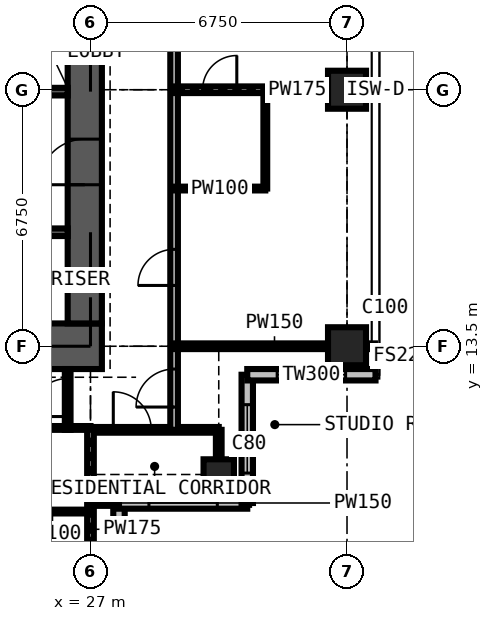
"""IFC4 building model, lengths in metres.
Left out: names, types, materials, properties, quantities, classifications, styles, units other than length and angle.
Written with IfcOpenShell. Run it as: python <this file> out.ifc"""

import sys

from ifc_helpers import new_model, si_unit, direction, frame, frame_2d, origin, origin_2d, place, context, subcontext, project, spatial, rectangle, extrude, element, fill, save


model = new_model("IFC4")
c1 = context("Model", 3, precision=1e-05, world=origin(), true_north=direction((0.0, 1.0)))
c2 = subcontext(c1, "Body", "Model", "MODEL_VIEW")
j1 = project(units=[si_unit("LENGTHUNIT", "METRE"), si_unit("PLANEANGLEUNIT", "RADIAN")], contexts=[c1])
p1 = place(None, origin())
s1 = spatial("IfcSite", under=j1, at=p1, CompositionType="ELEMENT")
p2 = place(p1, origin())
s2 = spatial("IfcBuilding", under=s1, at=p2, CompositionType="ELEMENT")
p3 = place(p2, frame((0.0, 0.0, 236.7)))
s3 = spatial("IfcBuildingStorey", under=s2, at=p3, CompositionType="ELEMENT", Elevation=236.7)
p4 = place(p3, frame((30.375, 10.125, 0.0), z_axis=(0.0, 0.0, 1.0), x_axis=(1.0, 0.0, 0.0)))
e1 = element("IfcColumn", 1, at=p4, inside=s3, PredefinedType="COLUMN", context=c2, shape_type="SweptSolid", body=[
    extrude(rectangle(XDim=0.8, YDim=0.8, at=origin_2d()), origin(), (0.0, 0.0, 1.0), 3.6),
])
for number, where, z_axis, x_axis in (
    (2, (33.75, 13.5, 0.0), (0.0, 0.0, 1.0), (1.0, 0.0, 0.0)),
    (3, (33.75, 20.25, 0.0), (0.0, 0.0, 1.0), (1.0, 0.0, 0.0)),
):
    element("IfcColumn", number, at=place(p3, frame(where, z_axis=z_axis, x_axis=x_axis)), inside=s3, PredefinedType="COLUMN", context=c2, shape_type="SweptSolid", body=[
        extrude(rectangle(XDim=1.0, YDim=1.0, at=origin_2d()), origin(), (0.0, 0.0, 1.0), 3.6),
    ])
p5 = place(p3, frame((13.2, 13.5, 0.0), z_axis=(0.0, 0.0, 1.0), x_axis=(1.0, 0.0, 0.0)))
e4 = element("IfcWall", 4, at=p5, inside=s3, PredefinedType="SHEAR", context=c2, shape_type="SweptSolid", body=[
    extrude(rectangle(XDim=14.1, YDim=1.2, at=frame_2d((7.05, 0.0))), origin(), (0.0, 0.0, 1.0), 3.6),
])
p6 = place(p3, frame((26.85, 14.1, 0.0), z_axis=(0.0, 0.0, 1.0), x_axis=(0.0, 1.0, 0.0)))
e5 = element("IfcWall", 5, at=p6, inside=s3, PredefinedType="SHEAR", context=c2, shape_type="SweptSolid", body=[
    extrude(rectangle(XDim=12.3, YDim=0.9, at=frame_2d((6.15, 0.0))), origin(), (0.0, 0.0, 1.0), 3.6),
])
p7 = place(p6, frame((3.65, 0.0, 0.0)))
e6 = element("IfcOpeningElement", 6, at=p7, cuts=e5, PredefinedType="OPENING", context=c2, shape_type="SweptSolid", body=[
    extrude(rectangle(XDim=1.2, YDim=2.2, at=frame_2d((0.6, 1.1))), frame((0.0, 0.46, 0.0), z_axis=(0.0, -1.0, 0.0), x_axis=(1.0, 0.0, 0.0)), (0.0, 0.0, 1.0), 0.92),
])
p8 = place(p3, frame((27.75, 6.0, 0.0), z_axis=(0.0, 0.0, 1.0), x_axis=(0.0, 1.0, 0.0)))
e7 = element("IfcWall", 7, at=p8, inside=s3, PredefinedType="SOLIDWALL", context=c2, shape_type="SweptSolid", body=[
    extrude(rectangle(XDim=3.375, YDim=0.3, at=frame_2d((1.688, 0.0))), origin(), (0.0, 0.0, 1.0), 3.375),
])
p9 = place(p8, frame((0.788, 0.0, 0.6)))
e8 = element("IfcOpeningElement", 8, at=p9, cuts=e7, PredefinedType="OPENING", context=c2, shape_type="SweptSolid", body=[
    extrude(rectangle(XDim=1.8, YDim=2.1, at=frame_2d((0.9, 1.05))), frame((0.0, 0.16, 0.0), z_axis=(0.0, -1.0, 0.0), x_axis=(1.0, 0.0, 0.0)), (0.0, 0.0, 1.0), 0.32),
])
p10 = place(p3, frame((27.75, 9.375, 0.0), z_axis=(0.0, 0.0, 1.0), x_axis=(1.0, 0.0, 0.0)))
e9 = element("IfcWall", 9, at=p10, inside=s3, PredefinedType="SOLIDWALL", context=c2, shape_type="SweptSolid", body=[
    extrude(rectangle(XDim=3.375, YDim=0.3, at=frame_2d((1.688, 0.0))), origin(), (0.0, 0.0, 1.0), 3.375),
])
p11 = place(p10, frame((0.788, 0.0, 0.6)))
e10 = element("IfcOpeningElement", 10, at=p11, cuts=e9, PredefinedType="OPENING", context=c2, shape_type="SweptSolid", body=[
    extrude(rectangle(XDim=1.8, YDim=2.1, at=frame_2d((0.9, 1.05))), frame((0.0, 0.16, 0.0), z_axis=(0.0, -1.0, 0.0), x_axis=(1.0, 0.0, 0.0)), (0.0, 0.0, 1.0), 0.32),
])
p12 = place(p3, frame((31.125, 9.375, 0.0), z_axis=(0.0, 0.0, 1.0), x_axis=(0.0, 1.0, 0.0)))
e11 = element("IfcWall", 11, at=p12, inside=s3, PredefinedType="SOLIDWALL", context=c2, shape_type="SweptSolid", body=[
    extrude(rectangle(XDim=3.375, YDim=0.3, at=frame_2d((1.688, 0.0))), origin(), (0.0, 0.0, 1.0), 3.375),
])
p13 = place(p12, frame((0.788, 0.0, 0.6)))
e12 = element("IfcOpeningElement", 12, at=p13, cuts=e11, PredefinedType="OPENING", context=c2, shape_type="SweptSolid", body=[
    extrude(rectangle(XDim=1.8, YDim=2.1, at=frame_2d((0.9, 1.05))), frame((0.0, 0.16, 0.0), z_axis=(0.0, -1.0, 0.0), x_axis=(1.0, 0.0, 0.0)), (0.0, 0.0, 1.0), 0.32),
])
p14 = place(p3, frame((31.125, 12.75, 0.0), z_axis=(0.0, 0.0, 1.0), x_axis=(1.0, 0.0, 0.0)))
e13 = element("IfcWall", 13, at=p14, inside=s3, PredefinedType="SOLIDWALL", context=c2, shape_type="SweptSolid", body=[
    extrude(rectangle(XDim=3.375, YDim=0.3, at=frame_2d((1.688, 0.0))), origin(), (0.0, 0.0, 1.0), 3.375),
])
p15 = place(p14, frame((0.788, 0.0, 0.6)))
e14 = element("IfcOpeningElement", 14, at=p15, cuts=e13, PredefinedType="OPENING", context=c2, shape_type="SweptSolid", body=[
    extrude(rectangle(XDim=1.8, YDim=2.1, at=frame_2d((0.9, 1.05))), frame((0.0, 0.16, 0.0), z_axis=(0.0, -1.0, 0.0), x_axis=(1.0, 0.0, 0.0)), (0.0, 0.0, 1.0), 0.32),
])
p16 = place(p3, frame((14.1, 16.5, 0.0), z_axis=(0.0, 0.0, 1.0), x_axis=(1.0, 0.0, 0.0)))
e15 = element("IfcWall", 15, at=p16, inside=s3, PredefinedType="SHEAR", context=c2, shape_type="SweptSolid", body=[
    extrude(rectangle(XDim=12.3, YDim=0.2, at=frame_2d((6.15, 0.0))), origin(), (0.0, 0.0, 1.0), 3.6),
])
p17 = place(p16, frame((0.9, 0.0, 0.0)))
e16 = element("IfcOpeningElement", 16, at=p17, cuts=e15, PredefinedType="OPENING", context=c2, shape_type="SweptSolid", body=[
    extrude(rectangle(XDim=1.1, YDim=2.2, at=frame_2d((0.55, 1.1))), frame((0.0, 0.11, 0.0), z_axis=(0.0, -1.0, 0.0), x_axis=(1.0, 0.0, 0.0)), (0.0, 0.0, 1.0), 0.22),
])
p18 = place(p16, frame((4.31, 0.0, 0.0)))
e17 = element("IfcOpeningElement", 17, at=p18, cuts=e15, PredefinedType="OPENING", context=c2, shape_type="SweptSolid", body=[
    extrude(rectangle(XDim=1.1, YDim=2.2, at=frame_2d((0.55, 1.1))), frame((0.0, 0.11, 0.0), z_axis=(0.0, -1.0, 0.0), x_axis=(1.0, 0.0, 0.0)), (0.0, 0.0, 1.0), 0.22),
])
p19 = place(p16, frame((6.45, 0.0, 0.0)))
e18 = element("IfcOpeningElement", 18, at=p19, cuts=e15, PredefinedType="OPENING", context=c2, shape_type="SweptSolid", body=[
    extrude(rectangle(XDim=1.1, YDim=2.2, at=frame_2d((0.55, 1.1))), frame((0.0, 0.11, 0.0), z_axis=(0.0, -1.0, 0.0), x_axis=(1.0, 0.0, 0.0)), (0.0, 0.0, 1.0), 0.22),
])
p20 = place(p16, frame((9.5, 0.0, 0.0)))
e19 = element("IfcOpeningElement", 19, at=p20, cuts=e15, PredefinedType="OPENING", context=c2, shape_type="SweptSolid", body=[
    extrude(rectangle(XDim=1.1, YDim=2.2, at=frame_2d((0.55, 1.1))), frame((0.0, 0.11, 0.0), z_axis=(0.0, -1.0, 0.0), x_axis=(1.0, 0.0, 0.0)), (0.0, 0.0, 1.0), 0.22),
])
p21 = place(p3, frame((14.1, 20.2, 0.0), z_axis=(0.0, 0.0, 1.0), x_axis=(1.0, 0.0, 0.0)))
e20 = element("IfcWall", 20, at=p21, inside=s3, PredefinedType="SHEAR", context=c2, shape_type="SweptSolid", body=[
    extrude(rectangle(XDim=12.3, YDim=0.2, at=frame_2d((6.15, 0.0))), origin(), (0.0, 0.0, 1.0), 3.6),
])
p22 = place(p21, frame((4.56, 0.0, 0.0)))
e21 = element("IfcOpeningElement", 21, at=p22, cuts=e20, PredefinedType="OPENING", context=c2, shape_type="SweptSolid", body=[
    extrude(rectangle(XDim=1.1, YDim=2.2, at=frame_2d((0.55, 1.1))), frame((0.0, 0.11, 0.0), z_axis=(0.0, -1.0, 0.0), x_axis=(1.0, 0.0, 0.0)), (0.0, 0.0, 1.0), 0.22),
])
p23 = place(p21, frame((6.7, 0.0, 0.0)))
e22 = element("IfcOpeningElement", 22, at=p23, cuts=e20, PredefinedType="OPENING", context=c2, shape_type="SweptSolid", body=[
    extrude(rectangle(XDim=1.1, YDim=2.2, at=frame_2d((0.55, 1.1))), frame((0.0, 0.11, 0.0), z_axis=(0.0, -1.0, 0.0), x_axis=(1.0, 0.0, 0.0)), (0.0, 0.0, 1.0), 0.22),
])
p24 = place(p21, frame((0.35, 0.0, 0.0)))
e23 = element("IfcOpeningElement", 23, at=p24, cuts=e20, PredefinedType="OPENING", context=c2, shape_type="SweptSolid", body=[
    extrude(rectangle(XDim=1.1, YDim=2.2, at=frame_2d((0.55, 1.1))), frame((0.0, 0.11, 0.0), z_axis=(0.0, -1.0, 0.0), x_axis=(1.0, 0.0, 0.0)), (0.0, 0.0, 1.0), 0.22),
])
p25 = place(p21, frame((9.75, 0.0, 0.0)))
e24 = element("IfcOpeningElement", 24, at=p25, cuts=e20, PredefinedType="OPENING", context=c2, shape_type="SweptSolid", body=[
    extrude(rectangle(XDim=1.1, YDim=2.2, at=frame_2d((0.55, 1.1))), frame((0.0, 0.11, 0.0), z_axis=(0.0, -1.0, 0.0), x_axis=(1.0, 0.0, 0.0)), (0.0, 0.0, 1.0), 0.22),
])
p26 = place(p3, frame((23.625, 11.35, 0.0), z_axis=(0.0, 0.0, 1.0), x_axis=(1.0, 0.0, 0.0)))
e25 = element("IfcWall", 25, at=p26, inside=s3, PredefinedType="PARTITIONING", context=c2, shape_type="SweptSolid", body=[
    extrude(rectangle(XDim=3.375, YDim=0.1, at=frame_2d((1.688, 0.0))), origin(), (0.0, 0.0, 1.0), 3.375),
])
p27 = place(p26, frame((0.2, 0.0, 0.0)))
e26 = element("IfcOpeningElement", 26, at=p27, cuts=e25, PredefinedType="OPENING", context=c2, shape_type="SweptSolid", body=[
    extrude(rectangle(XDim=0.95, YDim=2.2, at=frame_2d((0.475, 1.1))), frame((0.0, 0.06, 0.0), z_axis=(0.0, -1.0, 0.0), x_axis=(1.0, 0.0, 0.0)), (0.0, 0.0, 1.0), 0.12),
])
p28 = place(p3, frame((25.0, 9.15, 0.0), z_axis=(0.0, 0.0, 1.0), x_axis=(1.0, 0.0, 0.0)))
e27 = element("IfcWall", 27, at=p28, inside=s3, PredefinedType="PARTITIONING", context=c2, shape_type="SweptSolid", body=[
    extrude(rectangle(XDim=2.0, YDim=0.1, at=frame_2d((1.0, 0.0))), origin(), (0.0, 0.0, 1.0), 3.375),
])
p29 = place(p3, frame((26.4, 11.3, 0.0), z_axis=(0.0, 0.0, 1.0), x_axis=(0.0, 1.0, 0.0)))
e28 = element("IfcWall", 28, at=p29, inside=s3, PredefinedType="PARTITIONING", context=c2, shape_type="SweptSolid", body=[
    extrude(rectangle(XDim=1.6, YDim=0.15, at=frame_2d((0.8, 0.0))), origin(), (0.0, 0.0, 1.0), 3.375),
])
p30 = place(p29, frame((0.35, 0.0, 0.0)))
e29 = element("IfcOpeningElement", 29, at=p30, cuts=e28, PredefinedType="OPENING", context=c2, shape_type="SweptSolid", body=[
    extrude(rectangle(XDim=1.0, YDim=2.2, at=frame_2d((0.5, 1.1))), frame((0.0, 0.085, 0.0), z_axis=(0.0, -1.0, 0.0), x_axis=(1.0, 0.0, 0.0)), (0.0, 0.0, 1.0), 0.17),
])
p31 = place(p3, frame((27.0, 11.3, 0.0), z_axis=(0.0, 0.0, 1.0), x_axis=(1.0, 0.0, 0.0)))
e30 = element("IfcWall", 30, at=p31, inside=s3, PredefinedType="PARTITIONING", context=c2, shape_type="SweptSolid", body=[
    extrude(rectangle(XDim=3.375, YDim=0.15, at=frame_2d((1.688, 0.0))), origin(), (0.0, 0.0, 1.0), 3.375),
])
p32 = place(p31, frame((0.6, 0.0, 0.0)))
e31 = element("IfcOpeningElement", 31, at=p32, cuts=e30, PredefinedType="OPENING", context=c2, shape_type="SweptSolid", body=[
    extrude(rectangle(XDim=1.0, YDim=2.2, at=frame_2d((0.5, 1.1))), frame((0.0, 0.085, 0.0), z_axis=(0.0, -1.0, 0.0), x_axis=(1.0, 0.0, 0.0)), (0.0, 0.0, 1.0), 0.17),
])
p33 = place(p3, frame((27.0, 6.016, 0.0), z_axis=(0.0, 0.0, 1.0), x_axis=(0.0, 1.0, 0.0)))
e32 = element("IfcWall", 32, at=p33, inside=s3, PredefinedType="PARTITIONING", context=c2, shape_type="SweptSolid", body=[
    extrude(rectangle(XDim=5.334, YDim=0.175, at=frame_2d((2.667, 0.0))), origin(), (0.0, 0.0, 1.0), 2.877),
])
p34 = place(p3, frame((27.0, 9.375, 0.0), z_axis=(0.0, 0.0, 1.0), x_axis=(1.0, 0.0, 0.0)))
e33 = element("IfcWall", 33, at=p34, inside=s3, PredefinedType="PARTITIONING", context=c2, shape_type="SweptSolid", body=[
    extrude(rectangle(XDim=0.734, YDim=0.15, at=frame_2d((0.367, 0.0))), origin(), (0.0, 0.0, 1.0), 3.375),
])
p35 = place(p3, frame((29.2, 11.3, 0.0), z_axis=(0.0, 0.0, 1.0), x_axis=(0.0, 1.0, 0.0)))
e34 = element("IfcWall", 34, at=p35, inside=s3, PredefinedType="PARTITIONING", context=c2, shape_type="SweptSolid", body=[
    extrude(rectangle(XDim=17.9, YDim=0.2, at=frame_2d((8.95, 0.0))), origin(), (0.0, 0.0, 1.0), 3.375),
])
p36 = place(p35, frame((0.6, 0.0, 0.0)))
e35 = element("IfcOpeningElement", 35, at=p36, cuts=e34, PredefinedType="OPENING", context=c2, shape_type="SweptSolid", body=[
    extrude(rectangle(XDim=1.0, YDim=2.2, at=frame_2d((0.5, 1.1))), frame((0.0, 0.11, 0.0), z_axis=(0.0, -1.0, 0.0), x_axis=(1.0, 0.0, 0.0)), (0.0, 0.0, 1.0), 0.22),
])
p37 = place(p35, frame((10.55, 0.0, 0.0)))
e36 = element("IfcOpeningElement", 36, at=p37, cuts=e34, PredefinedType="OPENING", context=c2, shape_type="SweptSolid", body=[
    extrude(rectangle(XDim=0.95, YDim=2.2, at=frame_2d((0.475, 1.1))), frame((0.0, 0.11, 0.0), z_axis=(0.0, -1.0, 0.0), x_axis=(1.0, 0.0, 0.0)), (0.0, 0.0, 1.0), 0.22),
])
p38 = place(p35, frame((3.8, 0.0, 0.0)))
e37 = element("IfcOpeningElement", 37, at=p38, cuts=e34, PredefinedType="OPENING", context=c2, shape_type="SweptSolid", body=[
    extrude(rectangle(XDim=0.95, YDim=2.2, at=frame_2d((0.475, 1.1))), frame((0.0, 0.11, 0.0), z_axis=(0.0, -1.0, 0.0), x_axis=(1.0, 0.0, 0.0)), (0.0, 0.0, 1.0), 0.22),
])
p39 = place(p35, frame((16.3, 0.0, 0.0)))
e38 = element("IfcOpeningElement", 38, at=p39, cuts=e34, PredefinedType="OPENING", context=c2, shape_type="SweptSolid", body=[
    extrude(rectangle(XDim=1.0, YDim=2.2, at=frame_2d((0.5, 1.1))), frame((0.0, 0.11, 0.0), z_axis=(0.0, -1.0, 0.0), x_axis=(1.0, 0.0, 0.0)), (0.0, 0.0, 1.0), 0.22),
])
p40 = place(p3, frame((29.2, 13.5, 0.0), z_axis=(0.0, 0.0, 1.0), x_axis=(1.0, 0.0, 0.0)))
e39 = element("IfcWall", 39, at=p40, inside=s3, PredefinedType="PARTITIONING", context=c2, shape_type="SweptSolid", body=[
    extrude(rectangle(XDim=5.284, YDim=0.15, at=frame_2d((2.642, 0.0))), origin(), (0.0, 0.0, 1.0), 2.877),
])
p41 = place(p3, frame((29.2, 17.65, 0.0), z_axis=(0.0, 0.0, 1.0), x_axis=(1.0, 0.0, 0.0)))
e40 = element("IfcWall", 40, at=p41, inside=s3, PredefinedType="PARTITIONING", context=c2, shape_type="SweptSolid", body=[
    extrude(rectangle(XDim=2.4, YDim=0.1, at=frame_2d((1.2, 0.0))), origin(), (0.0, 0.0, 1.0), 3.375),
])
p42 = place(p3, frame((29.2, 20.25, 0.0), z_axis=(0.0, 0.0, 1.0), x_axis=(1.0, 0.0, 0.0)))
e41 = element("IfcWall", 41, at=p42, inside=s3, PredefinedType="PARTITIONING", context=c2, shape_type="SweptSolid", body=[
    extrude(rectangle(XDim=5.284, YDim=0.175, at=frame_2d((2.642, 0.0))), origin(), (0.0, 0.0, 1.0), 2.877),
])
p43 = place(p42, frame((0.75, 0.0, 0.0)))
e42 = element("IfcOpeningElement", 42, at=p43, cuts=e41, PredefinedType="OPENING", context=c2, shape_type="SweptSolid", body=[
    extrude(rectangle(XDim=0.9, YDim=2.2, at=frame_2d((0.45, 1.1))), frame((0.0, 0.097, 0.0), z_axis=(0.0, -1.0, 0.0), x_axis=(1.0, 0.0, 0.0)), (0.0, 0.0, 1.0), 0.195),
])
p44 = place(p3, frame((30.375, 9.525, 0.0), z_axis=(0.0, 0.0, 1.0), x_axis=(0.0, 1.0, 0.0)))
e43 = element("IfcWall", 43, at=p44, inside=s3, PredefinedType="PARTITIONING", context=c2, shape_type="SweptSolid", body=[
    extrude(rectangle(XDim=1.775, YDim=0.15, at=frame_2d((0.888, 0.0))), origin(), (0.0, 0.0, 1.0), 2.877),
])
p45 = place(p3, frame((31.6, 17.65, 0.0), z_axis=(0.0, 0.0, 1.0), x_axis=(0.0, 1.0, 0.0)))
e44 = element("IfcWall", 44, at=p45, inside=s3, PredefinedType="PARTITIONING", context=c2, shape_type="SweptSolid", body=[
    extrude(rectangle(XDim=2.6, YDim=0.1, at=frame_2d((1.3, 0.0))), origin(), (0.0, 0.0, 1.0), 3.375),
])
p46 = place(p9, origin())
e45 = element("IfcWindow", 45, at=p46, inside=s3, PartitioningType="SINGLE_PANEL", PredefinedType="WINDOW", context=c2, shape_type="SweptSolid", body=[
    extrude(rectangle(XDim=1.8, YDim=2.1, at=frame_2d((0.9, 1.05))), frame((0.0, 0.03, 0.0), z_axis=(0.0, -1.0, 0.0), x_axis=(1.0, 0.0, 0.0)), (0.0, 0.0, 1.0), 0.06),
])
fill(e8, e45)
p47 = place(p11, origin())
e46 = element("IfcWindow", 46, at=p47, inside=s3, PartitioningType="SINGLE_PANEL", PredefinedType="WINDOW", context=c2, shape_type="SweptSolid", body=[
    extrude(rectangle(XDim=1.8, YDim=2.1, at=frame_2d((0.9, 1.05))), frame((0.0, 0.03, 0.0), z_axis=(0.0, -1.0, 0.0), x_axis=(1.0, 0.0, 0.0)), (0.0, 0.0, 1.0), 0.06),
])
fill(e10, e46)
p48 = place(p13, origin())
e47 = element("IfcWindow", 47, at=p48, inside=s3, PartitioningType="SINGLE_PANEL", PredefinedType="WINDOW", context=c2, shape_type="SweptSolid", body=[
    extrude(rectangle(XDim=1.8, YDim=2.1, at=frame_2d((0.9, 1.05))), frame((0.0, 0.03, 0.0), z_axis=(0.0, -1.0, 0.0), x_axis=(1.0, 0.0, 0.0)), (0.0, 0.0, 1.0), 0.06),
])
fill(e12, e47)
p49 = place(p15, origin())
e48 = element("IfcWindow", 48, at=p49, inside=s3, PartitioningType="SINGLE_PANEL", PredefinedType="WINDOW", context=c2, shape_type="SweptSolid", body=[
    extrude(rectangle(XDim=1.8, YDim=2.1, at=frame_2d((0.9, 1.05))), frame((0.0, 0.03, 0.0), z_axis=(0.0, -1.0, 0.0), x_axis=(1.0, 0.0, 0.0)), (0.0, 0.0, 1.0), 0.06),
])
fill(e14, e48)
p50 = place(p7, origin())
e49 = element("IfcDoor", 49, at=p50, inside=s3, OperationType="DOUBLE_DOOR_SINGLE_SWING", PredefinedType="DOOR", context=c2, shape_type="SweptSolid", body=[
    extrude(rectangle(XDim=1.2, YDim=2.2, at=frame_2d((0.6, 1.1))), frame((0.0, 0.025, 0.0), z_axis=(0.0, -1.0, 0.0), x_axis=(1.0, 0.0, 0.0)), (0.0, 0.0, 1.0), 0.05),
])
fill(e6, e49)
p51 = place(p32, origin())
e50 = element("IfcDoor", 50, at=p51, inside=s3, OperationType="SINGLE_SWING_LEFT", PredefinedType="DOOR", context=c2, shape_type="SweptSolid", body=[
    extrude(rectangle(XDim=1.0, YDim=2.2, at=frame_2d((0.5, 1.1))), frame((0.0, 0.025, 0.0), z_axis=(0.0, -1.0, 0.0), x_axis=(1.0, 0.0, 0.0)), (0.0, 0.0, 1.0), 0.05),
])
fill(e31, e50)
p52 = place(p30, origin())
e51 = element("IfcDoor", 51, at=p52, inside=s3, OperationType="SINGLE_SWING_LEFT", PredefinedType="DOOR", context=c2, shape_type="SweptSolid", body=[
    extrude(rectangle(XDim=1.0, YDim=2.2, at=frame_2d((0.5, 1.1))), frame((0.0, 0.025, 0.0), z_axis=(0.0, -1.0, 0.0), x_axis=(1.0, 0.0, 0.0)), (0.0, 0.0, 1.0), 0.05),
])
fill(e29, e51)
p53 = place(p36, origin())
e52 = element("IfcDoor", 52, at=p53, inside=s3, OperationType="SINGLE_SWING_LEFT", PredefinedType="DOOR", context=c2, shape_type="SweptSolid", body=[
    extrude(rectangle(XDim=1.0, YDim=2.2, at=frame_2d((0.5, 1.1))), frame((0.0, 0.025, 0.0), z_axis=(0.0, -1.0, 0.0), x_axis=(1.0, 0.0, 0.0)), (0.0, 0.0, 1.0), 0.05),
])
fill(e35, e52)
p54 = place(p38, origin())
e53 = element("IfcDoor", 53, at=p54, inside=s3, OperationType="SINGLE_SWING_LEFT", PredefinedType="DOOR", context=c2, shape_type="SweptSolid", body=[
    extrude(rectangle(XDim=0.95, YDim=2.2, at=frame_2d((0.475, 1.1))), frame((0.0, 0.025, 0.0), z_axis=(0.0, -1.0, 0.0), x_axis=(1.0, 0.0, 0.0)), (0.0, 0.0, 1.0), 0.05),
])
fill(e37, e53)
p55 = place(p43, origin())
e54 = element("IfcDoor", 54, at=p55, inside=s3, OperationType="SINGLE_SWING_RIGHT", PredefinedType="DOOR", context=c2, shape_type="SweptSolid", body=[
    extrude(rectangle(XDim=0.9, YDim=2.2, at=frame_2d((0.45, 1.1))), frame((0.0, 0.025, 0.0), z_axis=(0.0, -1.0, 0.0), x_axis=(1.0, 0.0, 0.0)), (0.0, 0.0, 1.0), 0.05),
])
fill(e42, e54)
save(model, sys.argv[1])
